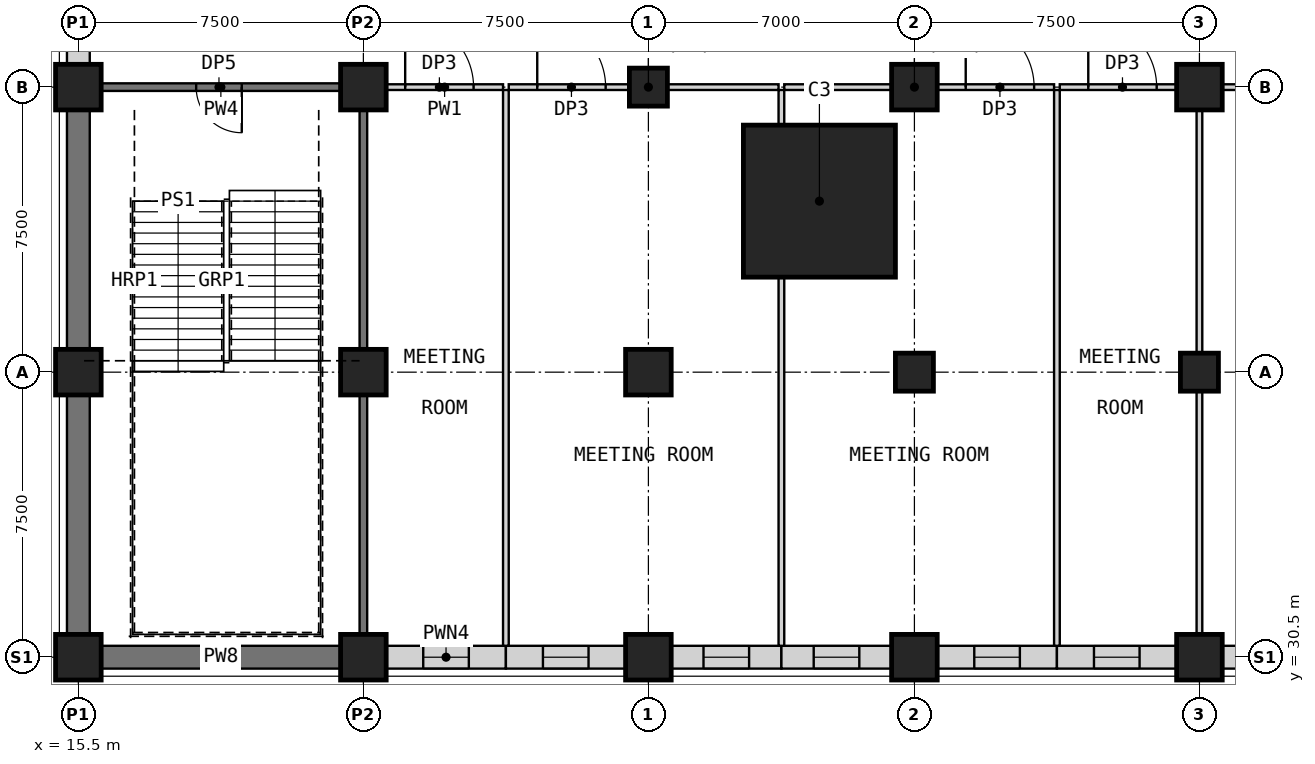
"""IFC4 building model, lengths in metres.
Left out: names, types, materials, properties, quantities, classifications, styles, units other than length and angle.
Written with IfcOpenShell. Run it as: python <this file> out.ifc"""

import sys

from ifc_helpers import new_model, si_unit, direction, frame, frame_2d, origin, origin_2d, place, context, subcontext, project, spatial, rectangle, extrude, element, fill, save


model = new_model("IFC4")
c1 = context("Model", 3, precision=1e-05, world=origin(), true_north=direction((0.0, 1.0)))
c2 = subcontext(c1, "Body", "Model", "MODEL_VIEW")
j1 = project(units=[si_unit("LENGTHUNIT", "METRE"), si_unit("PLANEANGLEUNIT", "RADIAN")], contexts=[c1])
p1 = place(None, origin())
s1 = spatial("IfcSite", under=j1, at=p1, CompositionType="ELEMENT")
p2 = place(p1, origin())
s2 = spatial("IfcBuilding", under=s1, at=p2, CompositionType="ELEMENT")
p3 = place(p2, frame((0.0, 0.0, 23.5)))
s3 = spatial("IfcBuildingStorey", under=s2, at=p3, CompositionType="ELEMENT", Elevation=23.5)
for number, where, z_axis, x_axis in (
    (1, (30.5, 45.5, 0.0), (0.0, 0.0, 1.0), (1.0, 0.0, 0.0)),
    (2, (37.5, 38.0, 0.0), (0.0, 0.0, 1.0), (1.0, 0.0, 0.0)),
):
    element("IfcColumn", number, at=place(p3, frame(where, z_axis=z_axis, x_axis=x_axis)), inside=s3, PredefinedType="COLUMN", context=c2, shape_type="SweptSolid", body=[
        extrude(rectangle(XDim=1.0, YDim=1.0, at=origin_2d()), origin(), (0.0, 0.0, 1.0), 5.5),
    ])
p4 = place(p3, frame((37.5, 45.5, 0.0), z_axis=(0.0, 0.0, 1.0), x_axis=(1.0, 0.0, 0.0)))
e3 = element("IfcColumn", 3, at=p4, inside=s3, PredefinedType="COLUMN", context=c2, shape_type="SweptSolid", body=[
    extrude(rectangle(XDim=1.2, YDim=1.2, at=origin_2d()), origin(), (0.0, 0.0, 1.0), 5.5),
])
p5 = place(p3, frame((45.0, 38.0, 0.0), z_axis=(0.0, 0.0, 1.0), x_axis=(1.0, 0.0, 0.0)))
e4 = element("IfcColumn", 4, at=p5, inside=s3, PredefinedType="COLUMN", context=c2, shape_type="SweptSolid", body=[
    extrude(rectangle(XDim=1.0, YDim=1.0, at=origin_2d()), origin(), (0.0, 0.0, 1.0), 5.5),
])
p6 = place(p3, frame((45.0, 45.5, 0.0), z_axis=(0.0, 0.0, 1.0), x_axis=(1.0, 0.0, 0.0)))
e5 = element("IfcColumn", 5, at=p6, inside=s3, PredefinedType="COLUMN", context=c2, shape_type="SweptSolid", body=[
    extrude(rectangle(XDim=1.2, YDim=1.2, at=origin_2d()), origin(), (0.0, 0.0, 1.0), 5.5),
])
p7 = place(p3, frame((35.0, 42.5, 0.0), z_axis=(0.0, 0.0, 1.0), x_axis=(1.0, 0.0, 0.0)))
e6 = element("IfcColumn", 6, at=p7, inside=s3, PredefinedType="COLUMN", context=c2, shape_type="SweptSolid", body=[
    extrude(rectangle(XDim=4.0, YDim=4.0, at=origin_2d()), origin(), (0.0, 0.0, 1.0), 5.5),
])
for number, where, z_axis, x_axis in (
    (7, (15.5, 30.5, 0.0), (0.0, 0.0, 1.0), (1.0, 0.0, 0.0)),
    (8, (15.5, 38.0, 0.0), (0.0, 0.0, 1.0), (1.0, 0.0, 0.0)),
    (9, (15.5, 45.5, 0.0), (0.0, 0.0, 1.0), (1.0, 0.0, 0.0)),
    (10, (23.0, 30.5, 0.0), (0.0, 0.0, 1.0), (1.0, 0.0, 0.0)),
    (11, (23.0, 38.0, 0.0), (0.0, 0.0, 1.0), (1.0, 0.0, 0.0)),
    (12, (23.0, 45.5, 0.0), (0.0, 0.0, 1.0), (1.0, 0.0, 0.0)),
    (13, (30.5, 30.5, 0.0), (0.0, 0.0, 1.0), (1.0, 0.0, 0.0)),
    (14, (30.5, 38.0, 0.0), (0.0, 0.0, 1.0), (1.0, 0.0, 0.0)),
    (15, (37.5, 30.5, 0.0), (0.0, 0.0, 1.0), (1.0, 0.0, 0.0)),
    (16, (45.0, 30.5, 0.0), (0.0, 0.0, 1.0), (1.0, 0.0, 0.0)),
):
    element("IfcColumn", number, at=place(p3, frame(where, z_axis=z_axis, x_axis=x_axis)), inside=s3, PredefinedType="COLUMN", context=c2, shape_type="SweptSolid", body=[
        extrude(rectangle(XDim=1.2, YDim=1.2, at=origin_2d()), origin(), (0.0, 0.0, 1.0), 5.5),
    ])
p8 = place(p3, frame((16.1, 30.5, 0.0), z_axis=(0.0, 0.0, 1.0), x_axis=(1.0, 0.0, 0.0)))
e17 = element("IfcWall", 17, at=p8, inside=s3, PredefinedType="PARTITIONING", context=c2, shape_type="SweptSolid", body=[
    extrude(rectangle(XDim=6.3, YDim=0.6, at=frame_2d((3.15, 0.0))), origin(), (0.0, 0.0, 1.0), 4.6),
])
p9 = place(p3, frame((23.6, 30.5, 0.0), z_axis=(0.0, 0.0, 1.0), x_axis=(1.0, 0.0, 0.0)))
e18 = element("IfcWall", 18, at=p9, inside=s3, PredefinedType="PARTITIONING", context=c2, shape_type="SweptSolid", body=[
    extrude(rectangle(XDim=3.15, YDim=0.6, at=frame_2d((1.575, 0.0))), origin(), (0.0, 0.0, 1.0), 4.6),
])
p10 = place(p9, frame((0.975, 0.0, 0.9)))
e19 = element("IfcOpeningElement", 19, at=p10, cuts=e18, PredefinedType="OPENING", context=c2, shape_type="SweptSolid", body=[
    extrude(rectangle(XDim=1.2, YDim=2.8, at=frame_2d((0.6, 1.4))), frame((0.0, 0.31, 0.0), z_axis=(0.0, -1.0, 0.0), x_axis=(1.0, 0.0, 0.0)), (0.0, 0.0, 1.0), 0.62),
])
p11 = place(p3, frame((26.75, 30.5, 0.0), z_axis=(0.0, 0.0, 1.0), x_axis=(1.0, 0.0, 0.0)))
e20 = element("IfcWall", 20, at=p11, inside=s3, PredefinedType="PARTITIONING", context=c2, shape_type="SweptSolid", body=[
    extrude(rectangle(XDim=3.15, YDim=0.6, at=frame_2d((1.575, 0.0))), origin(), (0.0, 0.0, 1.0), 4.6),
])
p12 = place(p11, frame((0.975, 0.0, 0.9)))
e21 = element("IfcOpeningElement", 21, at=p12, cuts=e20, PredefinedType="OPENING", context=c2, shape_type="SweptSolid", body=[
    extrude(rectangle(XDim=1.2, YDim=2.8, at=frame_2d((0.6, 1.4))), frame((0.0, 0.31, 0.0), z_axis=(0.0, -1.0, 0.0), x_axis=(1.0, 0.0, 0.0)), (0.0, 0.0, 1.0), 0.62),
])
p13 = place(p3, frame((31.1, 30.5, 0.0), z_axis=(0.0, 0.0, 1.0), x_axis=(1.0, 0.0, 0.0)))
e22 = element("IfcWall", 22, at=p13, inside=s3, PredefinedType="PARTITIONING", context=c2, shape_type="SweptSolid", body=[
    extrude(rectangle(XDim=2.9, YDim=0.6, at=frame_2d((1.45, 0.0))), origin(), (0.0, 0.0, 1.0), 4.6),
])
p14 = place(p13, frame((0.85, 0.0, 0.9)))
e23 = element("IfcOpeningElement", 23, at=p14, cuts=e22, PredefinedType="OPENING", context=c2, shape_type="SweptSolid", body=[
    extrude(rectangle(XDim=1.2, YDim=2.8, at=frame_2d((0.6, 1.4))), frame((0.0, 0.31, 0.0), z_axis=(0.0, -1.0, 0.0), x_axis=(1.0, 0.0, 0.0)), (0.0, 0.0, 1.0), 0.62),
])
p15 = place(p3, frame((34.0, 30.5, 0.0), z_axis=(0.0, 0.0, 1.0), x_axis=(1.0, 0.0, 0.0)))
e24 = element("IfcWall", 24, at=p15, inside=s3, PredefinedType="PARTITIONING", context=c2, shape_type="SweptSolid", body=[
    extrude(rectangle(XDim=2.9, YDim=0.6, at=frame_2d((1.45, 0.0))), origin(), (0.0, 0.0, 1.0), 4.6),
])
p16 = place(p15, frame((0.85, 0.0, 0.9)))
e25 = element("IfcOpeningElement", 25, at=p16, cuts=e24, PredefinedType="OPENING", context=c2, shape_type="SweptSolid", body=[
    extrude(rectangle(XDim=1.2, YDim=2.8, at=frame_2d((0.6, 1.4))), frame((0.0, 0.31, 0.0), z_axis=(0.0, -1.0, 0.0), x_axis=(1.0, 0.0, 0.0)), (0.0, 0.0, 1.0), 0.62),
])
p17 = place(p3, frame((38.1, 30.5, 0.0), z_axis=(0.0, 0.0, 1.0), x_axis=(1.0, 0.0, 0.0)))
e26 = element("IfcWall", 26, at=p17, inside=s3, PredefinedType="PARTITIONING", context=c2, shape_type="SweptSolid", body=[
    extrude(rectangle(XDim=3.15, YDim=0.6, at=frame_2d((1.575, 0.0))), origin(), (0.0, 0.0, 1.0), 4.6),
])
p18 = place(p17, frame((0.975, 0.0, 0.9)))
e27 = element("IfcOpeningElement", 27, at=p18, cuts=e26, PredefinedType="OPENING", context=c2, shape_type="SweptSolid", body=[
    extrude(rectangle(XDim=1.2, YDim=2.8, at=frame_2d((0.6, 1.4))), frame((0.0, 0.31, 0.0), z_axis=(0.0, -1.0, 0.0), x_axis=(1.0, 0.0, 0.0)), (0.0, 0.0, 1.0), 0.62),
])
p19 = place(p3, frame((41.25, 30.5, 0.0), z_axis=(0.0, 0.0, 1.0), x_axis=(1.0, 0.0, 0.0)))
e28 = element("IfcWall", 28, at=p19, inside=s3, PredefinedType="PARTITIONING", context=c2, shape_type="SweptSolid", body=[
    extrude(rectangle(XDim=3.15, YDim=0.6, at=frame_2d((1.575, 0.0))), origin(), (0.0, 0.0, 1.0), 4.6),
])
p20 = place(p19, frame((0.975, 0.0, 0.9)))
e29 = element("IfcOpeningElement", 29, at=p20, cuts=e28, PredefinedType="OPENING", context=c2, shape_type="SweptSolid", body=[
    extrude(rectangle(XDim=1.2, YDim=2.8, at=frame_2d((0.6, 1.4))), frame((0.0, 0.31, 0.0), z_axis=(0.0, -1.0, 0.0), x_axis=(1.0, 0.0, 0.0)), (0.0, 0.0, 1.0), 0.62),
])
p21 = place(p3, frame((45.6, 30.5, 0.0), z_axis=(0.0, 0.0, 1.0), x_axis=(1.0, 0.0, 0.0)))
e30 = element("IfcWall", 30, at=p21, inside=s3, PredefinedType="PARTITIONING", context=c2, shape_type="SweptSolid", body=[
    extrude(rectangle(XDim=6.3, YDim=0.6, at=frame_2d((3.15, 0.0))), origin(), (0.0, 0.0, 1.0), 4.6),
])
p22 = place(p21, frame((0.951, 0.0, 0.9)))
e31 = element("IfcOpeningElement", 31, at=p22, cuts=e30, PredefinedType="OPENING", context=c2, shape_type="SweptSolid", body=[
    extrude(rectangle(XDim=1.5, YDim=2.8, at=frame_2d((0.75, 1.4))), frame((0.0, 0.31, 0.0), z_axis=(0.0, -1.0, 0.0), x_axis=(1.0, 0.0, 0.0)), (0.0, 0.0, 1.0), 0.62),
])
p23 = place(p21, frame((3.849, 0.0, 0.9)))
e32 = element("IfcOpeningElement", 32, at=p23, cuts=e30, PredefinedType="OPENING", context=c2, shape_type="SweptSolid", body=[
    extrude(rectangle(XDim=1.5, YDim=2.8, at=frame_2d((0.75, 1.4))), frame((0.0, 0.31, 0.0), z_axis=(0.0, -1.0, 0.0), x_axis=(1.0, 0.0, 0.0)), (0.0, 0.0, 1.0), 0.62),
])
p24 = place(p3, frame((22.4, 45.5, 0.0), z_axis=(0.0, 0.0, 1.0), x_axis=(-1.0, 0.0, 0.0)))
e33 = element("IfcWall", 33, at=p24, inside=s3, PredefinedType="SHEAR", context=c2, shape_type="SweptSolid", body=[
    extrude(rectangle(XDim=6.3, YDim=0.2, at=frame_2d((3.15, 0.0))), origin(), (0.0, 0.0, 1.0), 5.2),
])
p25 = place(p24, frame((2.6, 0.0, 0.0)))
e34 = element("IfcOpeningElement", 34, at=p25, cuts=e33, PredefinedType="OPENING", context=c2, shape_type="SweptSolid", body=[
    extrude(rectangle(XDim=1.2, YDim=2.1, at=frame_2d((0.6, 1.05))), frame((0.0, 0.11, 0.0), z_axis=(0.0, -1.0, 0.0), x_axis=(1.0, 0.0, 0.0)), (0.0, 0.0, 1.0), 0.22),
])
p26 = place(p3, frame((23.6, 45.5, 0.0), z_axis=(0.0, 0.0, 1.0), x_axis=(1.0, 0.0, 0.0)))
e35 = element("IfcWall", 35, at=p26, inside=s3, PredefinedType="PARTITIONING", context=c2, shape_type="SweptSolid", body=[
    extrude(rectangle(XDim=3.075, YDim=0.15, at=frame_2d((1.538, 0.0))), origin(), (0.0, 0.0, 1.0), 5.2),
])
p27 = place(p26, frame((0.5, 0.0, 0.0)))
e36 = element("IfcOpeningElement", 36, at=p27, cuts=e35, PredefinedType="OPENING", context=c2, shape_type="SweptSolid", body=[
    extrude(rectangle(XDim=1.8, YDim=2.4, at=frame_2d((0.9, 1.2))), frame((0.0, 0.085, 0.0), z_axis=(0.0, -1.0, 0.0), x_axis=(1.0, 0.0, 0.0)), (0.0, 0.0, 1.0), 0.17),
])
p28 = place(p3, frame((26.825, 45.5, 0.0), z_axis=(0.0, 0.0, 1.0), x_axis=(1.0, 0.0, 0.0)))
e37 = element("IfcWall", 37, at=p28, inside=s3, PredefinedType="PARTITIONING", context=c2, shape_type="SweptSolid", body=[
    extrude(rectangle(XDim=3.175, YDim=0.15, at=frame_2d((1.587, 0.0))), origin(), (0.0, 0.0, 1.0), 5.2),
])
p29 = place(p28, frame((0.75, 0.0, 0.0)))
e38 = element("IfcOpeningElement", 38, at=p29, cuts=e37, PredefinedType="OPENING", context=c2, shape_type="SweptSolid", body=[
    extrude(rectangle(XDim=1.8, YDim=2.4, at=frame_2d((0.9, 1.2))), frame((0.0, 0.085, 0.0), z_axis=(0.0, -1.0, 0.0), x_axis=(1.0, 0.0, 0.0)), (0.0, 0.0, 1.0), 0.17),
])
p30 = place(p3, frame((31.0, 45.5, 0.0), z_axis=(0.0, 0.0, 1.0), x_axis=(1.0, 0.0, 0.0)))
e39 = element("IfcWall", 39, at=p30, inside=s3, PredefinedType="PARTITIONING", context=c2, shape_type="SweptSolid", body=[
    extrude(rectangle(XDim=2.925, YDim=0.15, at=frame_2d((1.462, 0.0))), origin(), (0.0, 0.0, 1.0), 5.2),
])
p31 = place(p3, frame((34.075, 45.5, 0.0), z_axis=(0.0, 0.0, 1.0), x_axis=(1.0, 0.0, 0.0)))
e40 = element("IfcWall", 40, at=p31, inside=s3, PredefinedType="PARTITIONING", context=c2, shape_type="SweptSolid", body=[
    extrude(rectangle(XDim=2.825, YDim=0.15, at=frame_2d((1.413, 0.0))), origin(), (0.0, 0.0, 1.0), 5.2),
])
p32 = place(p3, frame((38.1, 45.5, 0.0), z_axis=(0.0, 0.0, 1.0), x_axis=(1.0, 0.0, 0.0)))
e41 = element("IfcWall", 41, at=p32, inside=s3, PredefinedType="PARTITIONING", context=c2, shape_type="SweptSolid", body=[
    extrude(rectangle(XDim=3.075, YDim=0.15, at=frame_2d((1.538, 0.0))), origin(), (0.0, 0.0, 1.0), 5.2),
])
p33 = place(p32, frame((0.75, 0.0, 0.0)))
e42 = element("IfcOpeningElement", 42, at=p33, cuts=e41, PredefinedType="OPENING", context=c2, shape_type="SweptSolid", body=[
    extrude(rectangle(XDim=1.8, YDim=2.4, at=frame_2d((0.9, 1.2))), frame((0.0, 0.085, 0.0), z_axis=(0.0, -1.0, 0.0), x_axis=(1.0, 0.0, 0.0)), (0.0, 0.0, 1.0), 0.17),
])
p34 = place(p3, frame((41.325, 45.5, 0.0), z_axis=(0.0, 0.0, 1.0), x_axis=(1.0, 0.0, 0.0)))
e43 = element("IfcWall", 43, at=p34, inside=s3, PredefinedType="PARTITIONING", context=c2, shape_type="SweptSolid", body=[
    extrude(rectangle(XDim=3.075, YDim=0.15, at=frame_2d((1.538, 0.0))), origin(), (0.0, 0.0, 1.0), 5.2),
])
p35 = place(p34, frame((0.75, 0.0, 0.0)))
e44 = element("IfcOpeningElement", 44, at=p35, cuts=e43, PredefinedType="OPENING", context=c2, shape_type="SweptSolid", body=[
    extrude(rectangle(XDim=1.8, YDim=2.4, at=frame_2d((0.9, 1.2))), frame((0.0, 0.085, 0.0), z_axis=(0.0, -1.0, 0.0), x_axis=(1.0, 0.0, 0.0)), (0.0, 0.0, 1.0), 0.17),
])
p36 = place(p3, frame((45.6, 45.5, 0.0), z_axis=(0.0, 0.0, 1.0), x_axis=(1.0, 0.0, 0.0)))
e45 = element("IfcWall", 45, at=p36, inside=s3, PredefinedType="PARTITIONING", context=c2, shape_type="SweptSolid", body=[
    extrude(rectangle(XDim=6.3, YDim=0.15, at=frame_2d((3.15, 0.0))), origin(), (0.0, 0.0, 1.0), 5.2),
])
p37 = place(p36, frame((2.25, 0.0, 0.0)))
e46 = element("IfcOpeningElement", 46, at=p37, cuts=e45, PredefinedType="OPENING", context=c2, shape_type="SweptSolid", body=[
    extrude(rectangle(XDim=1.8, YDim=2.4, at=frame_2d((0.9, 1.2))), frame((0.0, 0.085, 0.0), z_axis=(0.0, -1.0, 0.0), x_axis=(1.0, 0.0, 0.0)), (0.0, 0.0, 1.0), 0.17),
])
for number, where, z_axis, x_axis in (
    (47, (15.5, 31.1, 0.0), (0.0, 0.0, 1.0), (0.0, 1.0, 0.0)),
    (48, (15.5, 38.6, 0.0), (0.0, 0.0, 1.0), (0.0, 1.0, 0.0)),
):
    element("IfcWall", number, at=place(p3, frame(where, z_axis=z_axis, x_axis=x_axis)), inside=s3, PredefinedType="PARTITIONING", context=c2, shape_type="SweptSolid", body=[
        extrude(rectangle(XDim=6.3, YDim=0.6, at=frame_2d((3.15, 0.0))), origin(), (0.0, 0.0, 1.0), 4.6),
    ])
p38 = place(p3, frame((15.5, 46.1, 0.0), z_axis=(0.0, 0.0, 1.0), x_axis=(0.0, 1.0, 0.0)))
e49 = element("IfcWall", 49, at=p38, inside=s3, PredefinedType="PARTITIONING", context=c2, shape_type="SweptSolid", body=[
    extrude(rectangle(XDim=5.8, YDim=0.6, at=frame_2d((2.9, 0.0))), origin(), (0.0, 0.0, 1.0), 4.6),
])
p39 = place(p38, frame((0.816, 0.0, 0.9)))
e50 = element("IfcOpeningElement", 50, at=p39, cuts=e49, PredefinedType="OPENING", context=c2, shape_type="SweptSolid", body=[
    extrude(rectangle(XDim=1.5, YDim=2.8, at=frame_2d((0.75, 1.4))), frame((0.0, 0.31, 0.0), z_axis=(0.0, -1.0, 0.0), x_axis=(1.0, 0.0, 0.0)), (0.0, 0.0, 1.0), 0.62),
])
p40 = place(p38, frame((3.484, 0.0, 0.9)))
e51 = element("IfcOpeningElement", 51, at=p40, cuts=e49, PredefinedType="OPENING", context=c2, shape_type="SweptSolid", body=[
    extrude(rectangle(XDim=1.5, YDim=2.8, at=frame_2d((0.75, 1.4))), frame((0.0, 0.31, 0.0), z_axis=(0.0, -1.0, 0.0), x_axis=(1.0, 0.0, 0.0)), (0.0, 0.0, 1.0), 0.62),
])
for number, where, z_axis, x_axis in (
    (52, (23.0, 31.1, 0.0), (0.0, 0.0, 1.0), (0.0, 1.0, 0.0)),
    (53, (23.0, 38.6, 0.0), (0.0, 0.0, 1.0), (0.0, 1.0, 0.0)),
):
    element("IfcWall", number, at=place(p3, frame(where, z_axis=z_axis, x_axis=x_axis)), inside=s3, PredefinedType="SHEAR", context=c2, shape_type="SweptSolid", body=[
        extrude(rectangle(XDim=6.3, YDim=0.2, at=frame_2d((3.15, 0.0))), origin(), (0.0, 0.0, 1.0), 5.2),
    ])
p41 = place(p3, frame((26.75, 30.8, 0.0), z_axis=(0.0, 0.0, 1.0), x_axis=(0.0, 1.0, 0.0)))
e54 = element("IfcWall", 54, at=p41, inside=s3, PredefinedType="PARTITIONING", context=c2, shape_type="SweptSolid", body=[
    extrude(rectangle(XDim=14.625, YDim=0.15, at=frame_2d((7.312, 0.0))), origin(), (0.0, 0.0, 1.0), 5.2),
])
p42 = place(p3, frame((34.0, 30.8, 0.0), z_axis=(0.0, 0.0, 1.0), x_axis=(0.0, 1.0, 0.0)))
e55 = element("IfcWall", 55, at=p42, inside=s3, PredefinedType="PARTITIONING", context=c2, shape_type="SweptSolid", body=[
    extrude(rectangle(XDim=9.7, YDim=0.15, at=frame_2d((4.85, 0.0))), origin(), (0.0, 0.0, 1.0), 5.2),
])
p43 = place(p3, frame((34.0, 44.5, 0.0), z_axis=(0.0, 0.0, 1.0), x_axis=(0.0, 1.0, 0.0)))
e56 = element("IfcWall", 56, at=p43, inside=s3, PredefinedType="PARTITIONING", context=c2, shape_type="SweptSolid", body=[
    extrude(rectangle(XDim=0.925, YDim=0.15, at=frame_2d((0.462, 0.0))), origin(), (0.0, 0.0, 1.0), 5.2),
])
p44 = place(p3, frame((41.25, 30.8, 0.0), z_axis=(0.0, 0.0, 1.0), x_axis=(0.0, 1.0, 0.0)))
e57 = element("IfcWall", 57, at=p44, inside=s3, PredefinedType="PARTITIONING", context=c2, shape_type="SweptSolid", body=[
    extrude(rectangle(XDim=14.625, YDim=0.15, at=frame_2d((7.312, 0.0))), origin(), (0.0, 0.0, 1.0), 5.2),
])
for number, where, z_axis, x_axis in (
    (58, (45.0, 31.1, 0.0), (0.0, 0.0, 1.0), (0.0, 1.0, 0.0)),
    (59, (45.0, 38.5, 0.0), (0.0, 0.0, 1.0), (0.0, 1.0, 0.0)),
):
    element("IfcWall", number, at=place(p3, frame(where, z_axis=z_axis, x_axis=x_axis)), inside=s3, PredefinedType="PARTITIONING", context=c2, shape_type="SweptSolid", body=[
        extrude(rectangle(XDim=6.4, YDim=0.15, at=frame_2d((3.2, 0.0))), origin(), (0.0, 0.0, 1.0), 5.2),
    ])
p45 = place(p10, origin())
e60 = element("IfcWindow", 60, at=p45, inside=s3, PartitioningType="SINGLE_PANEL", PredefinedType="WINDOW", context=c2, shape_type="SweptSolid", body=[
    extrude(rectangle(XDim=1.2, YDim=2.8, at=frame_2d((0.6, 1.4))), frame((0.0, 0.03, 0.0), z_axis=(0.0, -1.0, 0.0), x_axis=(1.0, 0.0, 0.0)), (0.0, 0.0, 1.0), 0.06),
])
fill(e19, e60)
p46 = place(p12, origin())
e61 = element("IfcWindow", 61, at=p46, inside=s3, PartitioningType="SINGLE_PANEL", PredefinedType="WINDOW", context=c2, shape_type="SweptSolid", body=[
    extrude(rectangle(XDim=1.2, YDim=2.8, at=frame_2d((0.6, 1.4))), frame((0.0, 0.03, 0.0), z_axis=(0.0, -1.0, 0.0), x_axis=(1.0, 0.0, 0.0)), (0.0, 0.0, 1.0), 0.06),
])
fill(e21, e61)
p47 = place(p14, origin())
e62 = element("IfcWindow", 62, at=p47, inside=s3, PartitioningType="SINGLE_PANEL", PredefinedType="WINDOW", context=c2, shape_type="SweptSolid", body=[
    extrude(rectangle(XDim=1.2, YDim=2.8, at=frame_2d((0.6, 1.4))), frame((0.0, 0.03, 0.0), z_axis=(0.0, -1.0, 0.0), x_axis=(1.0, 0.0, 0.0)), (0.0, 0.0, 1.0), 0.06),
])
fill(e23, e62)
p48 = place(p16, origin())
e63 = element("IfcWindow", 63, at=p48, inside=s3, PartitioningType="SINGLE_PANEL", PredefinedType="WINDOW", context=c2, shape_type="SweptSolid", body=[
    extrude(rectangle(XDim=1.2, YDim=2.8, at=frame_2d((0.6, 1.4))), frame((0.0, 0.03, 0.0), z_axis=(0.0, -1.0, 0.0), x_axis=(1.0, 0.0, 0.0)), (0.0, 0.0, 1.0), 0.06),
])
fill(e25, e63)
p49 = place(p18, origin())
e64 = element("IfcWindow", 64, at=p49, inside=s3, PartitioningType="SINGLE_PANEL", PredefinedType="WINDOW", context=c2, shape_type="SweptSolid", body=[
    extrude(rectangle(XDim=1.2, YDim=2.8, at=frame_2d((0.6, 1.4))), frame((0.0, 0.03, 0.0), z_axis=(0.0, -1.0, 0.0), x_axis=(1.0, 0.0, 0.0)), (0.0, 0.0, 1.0), 0.06),
])
fill(e27, e64)
p50 = place(p20, origin())
e65 = element("IfcWindow", 65, at=p50, inside=s3, PartitioningType="SINGLE_PANEL", PredefinedType="WINDOW", context=c2, shape_type="SweptSolid", body=[
    extrude(rectangle(XDim=1.2, YDim=2.8, at=frame_2d((0.6, 1.4))), frame((0.0, 0.03, 0.0), z_axis=(0.0, -1.0, 0.0), x_axis=(1.0, 0.0, 0.0)), (0.0, 0.0, 1.0), 0.06),
])
fill(e29, e65)
p51 = place(p25, origin())
e66 = element("IfcDoor", 66, at=p51, inside=s3, OperationType="SINGLE_SWING_LEFT", PredefinedType="DOOR", context=c2, shape_type="SweptSolid", body=[
    extrude(rectangle(XDim=1.2, YDim=2.1, at=frame_2d((0.6, 1.05))), frame((0.0, 0.025, 0.0), z_axis=(0.0, -1.0, 0.0), x_axis=(1.0, 0.0, 0.0)), (0.0, 0.0, 1.0), 0.05),
])
fill(e34, e66)
p52 = place(p27, origin())
e67 = element("IfcDoor", 67, at=p52, inside=s3, OperationType="SINGLE_SWING_LEFT", PredefinedType="DOOR", context=c2, shape_type="SweptSolid", body=[
    extrude(rectangle(XDim=1.8, YDim=2.4, at=frame_2d((0.9, 1.2))), frame((0.0, 0.025, 0.0), z_axis=(0.0, -1.0, 0.0), x_axis=(1.0, 0.0, 0.0)), (0.0, 0.0, 1.0), 0.05),
])
fill(e36, e67)
p53 = place(p29, origin())
e68 = element("IfcDoor", 68, at=p53, inside=s3, OperationType="SINGLE_SWING_LEFT", PredefinedType="DOOR", context=c2, shape_type="SweptSolid", body=[
    extrude(rectangle(XDim=1.8, YDim=2.4, at=frame_2d((0.9, 1.2))), frame((0.0, 0.025, 0.0), z_axis=(0.0, -1.0, 0.0), x_axis=(1.0, 0.0, 0.0)), (0.0, 0.0, 1.0), 0.05),
])
fill(e38, e68)
p54 = place(p33, origin())
e69 = element("IfcDoor", 69, at=p54, inside=s3, OperationType="SINGLE_SWING_LEFT", PredefinedType="DOOR", context=c2, shape_type="SweptSolid", body=[
    extrude(rectangle(XDim=1.8, YDim=2.4, at=frame_2d((0.9, 1.2))), frame((0.0, 0.025, 0.0), z_axis=(0.0, -1.0, 0.0), x_axis=(1.0, 0.0, 0.0)), (0.0, 0.0, 1.0), 0.05),
])
fill(e42, e69)
p55 = place(p35, origin())
e70 = element("IfcDoor", 70, at=p55, inside=s3, OperationType="SINGLE_SWING_LEFT", PredefinedType="DOOR", context=c2, shape_type="SweptSolid", body=[
    extrude(rectangle(XDim=1.8, YDim=2.4, at=frame_2d((0.9, 1.2))), frame((0.0, 0.025, 0.0), z_axis=(0.0, -1.0, 0.0), x_axis=(1.0, 0.0, 0.0)), (0.0, 0.0, 1.0), 0.05),
])
fill(e44, e70)
save(model, sys.argv[1])
